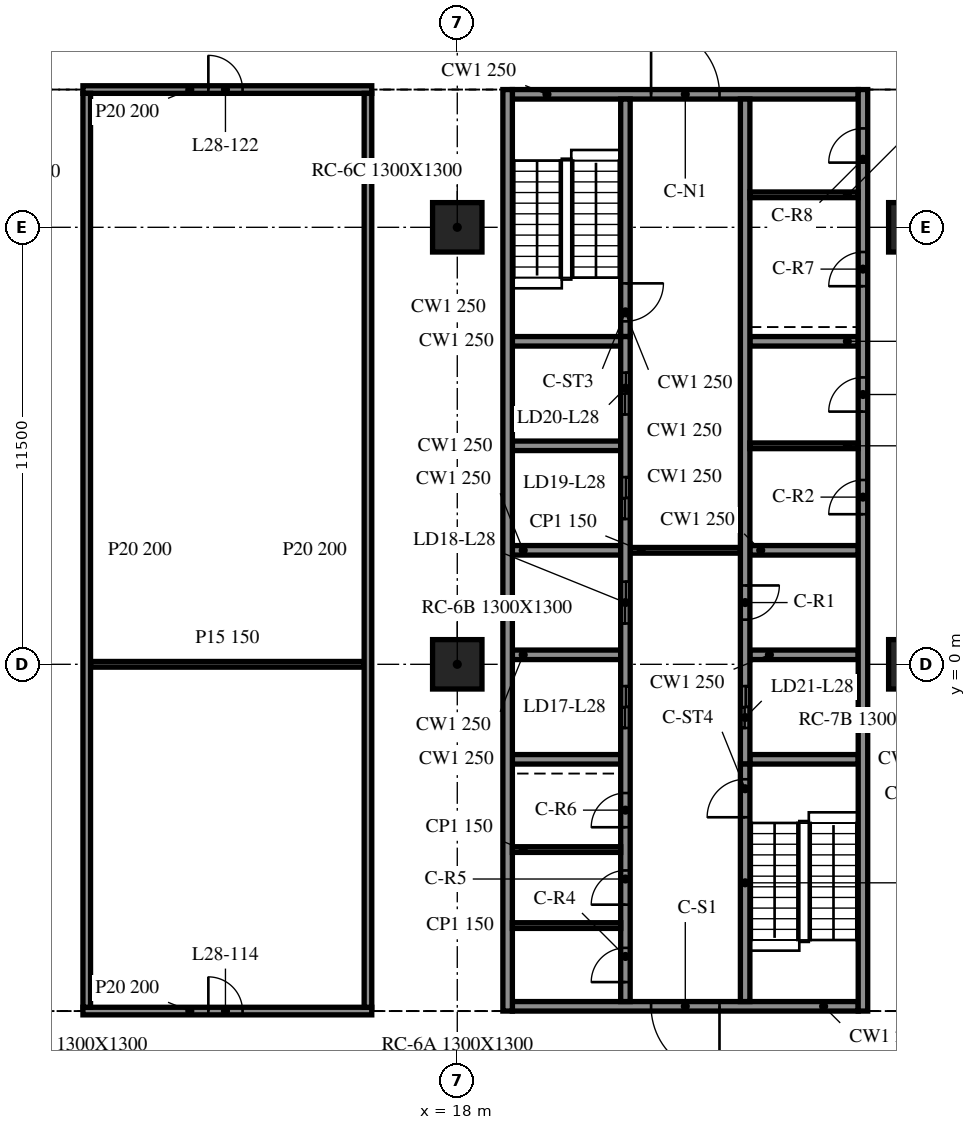
"""IFC4 building model, lengths in metres.
Left out: names, types, materials, properties, quantities, classifications, styles, units other than length and angle.
Written with IfcOpenShell. Run it as: python <this file> out.ifc"""

import sys

from ifc_helpers import new_model, si_unit, direction, frame, frame_2d, origin, origin_2d, place, context, subcontext, project, spatial, rectangle, extrude, element, fill, save


model = new_model("IFC4")
c1 = context("Model", 3, precision=1e-05, world=origin(), true_north=direction((0.0, 1.0)))
c2 = subcontext(c1, "Body", "Model", "MODEL_VIEW")
j1 = project(units=[si_unit("LENGTHUNIT", "METRE"), si_unit("PLANEANGLEUNIT", "RADIAN")], contexts=[c1])
p1 = place(None, origin())
s1 = spatial("IfcSite", under=j1, at=p1, CompositionType="ELEMENT")
p2 = place(p1, origin())
s2 = spatial("IfcBuilding", under=s1, at=p2, CompositionType="ELEMENT")
p3 = place(p2, frame((0.0, 0.0, 122.0)))
s3 = spatial("IfcBuildingStorey", under=s2, at=p3, CompositionType="ELEMENT", Elevation=122.0)
for number, where, z_axis, x_axis in (
    (1, (18.0, 0.0, -0.34), (0.0, 0.0, 1.0), (1.0, 0.0, 0.0)),
    (2, (18.0, 11.5, -0.34), (0.0, 0.0, 1.0), (1.0, 0.0, 0.0)),
    (3, (30.0, 0.0, -0.34), (0.0, 0.0, 1.0), (1.0, 0.0, 0.0)),
    (4, (30.0, 11.5, -0.34), (0.0, 0.0, 1.0), (1.0, 0.0, 0.0)),
):
    element("IfcColumn", number, at=place(p3, frame(where, z_axis=z_axis, x_axis=x_axis)), inside=s3, PredefinedType="COLUMN", context=c2, shape_type="SweptSolid", body=[
        extrude(rectangle(XDim=1.3, YDim=1.3, at=origin_2d()), origin(), (0.0, 0.0, 1.0), 4.1),
    ])
p4 = place(p3, frame((19.325, 15.125, 0.0), z_axis=(0.0, 0.0, 1.0), x_axis=(0.0, -1.0, 0.0)))
e5 = element("IfcWall", 5, at=p4, inside=s3, PredefinedType="SOLIDWALL", context=c2, shape_type="SweptSolid", body=[
    extrude(rectangle(XDim=24.25, YDim=0.25, at=frame_2d((12.125, 0.0))), origin(), (0.0, 0.0, 1.0), 3.76),
])
p5 = place(p3, frame((28.675, -9.125, 0.0), z_axis=(0.0, 0.0, 1.0), x_axis=(0.0, 1.0, 0.0)))
e6 = element("IfcWall", 6, at=p5, inside=s3, PredefinedType="SOLIDWALL", context=c2, shape_type="SweptSolid", body=[
    extrude(rectangle(XDim=24.25, YDim=0.25, at=frame_2d((12.125, 0.0))), origin(), (0.0, 0.0, 1.0), 3.76),
])
p6 = place(p5, frame((13.075, 0.0, 0.0)))
e7 = element("IfcOpeningElement", 7, at=p6, cuts=e6, PredefinedType="OPENING", context=c2, shape_type="SweptSolid", body=[
    extrude(rectangle(XDim=0.9, YDim=2.1, at=frame_2d((0.45, 1.05))), frame((0.0, 0.135, 0.0), z_axis=(0.0, -1.0, 0.0), x_axis=(1.0, 0.0, 0.0)), (0.0, 0.0, 1.0), 0.27),
])
p7 = place(p5, frame((15.775, 0.0, 0.0)))
e8 = element("IfcOpeningElement", 8, at=p7, cuts=e6, PredefinedType="OPENING", context=c2, shape_type="SweptSolid", body=[
    extrude(rectangle(XDim=0.9, YDim=2.1, at=frame_2d((0.45, 1.05))), frame((0.0, 0.135, 0.0), z_axis=(0.0, -1.0, 0.0), x_axis=(1.0, 0.0, 0.0)), (0.0, 0.0, 1.0), 0.27),
])
p8 = place(p5, frame((19.075, 0.0, 0.0)))
e9 = element("IfcOpeningElement", 9, at=p8, cuts=e6, PredefinedType="OPENING", context=c2, shape_type="SweptSolid", body=[
    extrude(rectangle(XDim=0.9, YDim=2.1, at=frame_2d((0.45, 1.05))), frame((0.0, 0.135, 0.0), z_axis=(0.0, -1.0, 0.0), x_axis=(1.0, 0.0, 0.0)), (0.0, 0.0, 1.0), 0.27),
])
p9 = place(p5, frame((22.327, 0.0, 0.0)))
e10 = element("IfcOpeningElement", 10, at=p9, cuts=e6, PredefinedType="OPENING", context=c2, shape_type="SweptSolid", body=[
    extrude(rectangle(XDim=0.9, YDim=2.1, at=frame_2d((0.45, 1.05))), frame((0.0, 0.135, 0.0), z_axis=(0.0, -1.0, 0.0), x_axis=(1.0, 0.0, 0.0)), (0.0, 0.0, 1.0), 0.27),
])
p10 = place(p3, frame((28.55, -9.0, 0.0), z_axis=(0.0, 0.0, 1.0), x_axis=(-1.0, 0.0, 0.0)))
e11 = element("IfcWall", 11, at=p10, inside=s3, PredefinedType="SOLIDWALL", context=c2, shape_type="SweptSolid", body=[
    extrude(rectangle(XDim=9.1, YDim=0.25, at=frame_2d((4.55, 0.0))), origin(), (0.0, 0.0, 1.0), 3.76),
])
p11 = place(p10, frame((3.65, 0.0, 0.0)))
e12 = element("IfcOpeningElement", 12, at=p11, cuts=e11, PredefinedType="OPENING", context=c2, shape_type="SweptSolid", body=[
    extrude(rectangle(XDim=1.8, YDim=2.1, at=frame_2d((0.9, 1.05))), frame((0.0, 0.135, 0.0), z_axis=(0.0, -1.0, 0.0), x_axis=(1.0, 0.0, 0.0)), (0.0, 0.0, 1.0), 0.27),
])
p12 = place(p3, frame((19.45, 15.0, 0.0), z_axis=(0.0, 0.0, 1.0), x_axis=(1.0, 0.0, 0.0)))
e13 = element("IfcWall", 13, at=p12, inside=s3, PredefinedType="SOLIDWALL", context=c2, shape_type="SweptSolid", body=[
    extrude(rectangle(XDim=9.1, YDim=0.25, at=frame_2d((4.55, 0.0))), origin(), (0.0, 0.0, 1.0), 3.76),
])
p13 = place(p12, frame((3.65, 0.0, 0.0)))
e14 = element("IfcOpeningElement", 14, at=p13, cuts=e13, PredefinedType="OPENING", context=c2, shape_type="SweptSolid", body=[
    extrude(rectangle(XDim=1.8, YDim=2.1, at=frame_2d((0.9, 1.05))), frame((0.0, 0.135, 0.0), z_axis=(0.0, -1.0, 0.0), x_axis=(1.0, 0.0, 0.0)), (0.0, 0.0, 1.0), 0.27),
])
p14 = place(p3, frame((22.425, -8.875, 0.0), z_axis=(0.0, 0.0, 1.0), x_axis=(0.0, 1.0, 0.0)))
e15 = element("IfcWall", 15, at=p14, inside=s3, PredefinedType="SOLIDWALL", context=c2, shape_type="SweptSolid", body=[
    extrude(rectangle(XDim=17.5, YDim=0.25, at=frame_2d((8.75, 0.0))), origin(), (0.0, 0.0, 1.0), 3.76),
])
p15 = place(p14, frame((7.2, 0.0, 0.0)))
e16 = element("IfcOpeningElement", 16, at=p15, cuts=e15, PredefinedType="OPENING", context=c2, shape_type="SweptSolid", body=[
    extrude(rectangle(XDim=1.1, YDim=2.1, at=frame_2d((0.55, 1.05))), frame((0.0, 0.135, 0.0), z_axis=(0.0, -1.0, 0.0), x_axis=(1.0, 0.0, 0.0)), (0.0, 0.0, 1.0), 0.27),
])
p16 = place(p14, frame((9.95, 0.0, 0.0)))
e17 = element("IfcOpeningElement", 17, at=p16, cuts=e15, PredefinedType="OPENING", context=c2, shape_type="SweptSolid", body=[
    extrude(rectangle(XDim=1.1, YDim=2.1, at=frame_2d((0.55, 1.05))), frame((0.0, 0.135, 0.0), z_axis=(0.0, -1.0, 0.0), x_axis=(1.0, 0.0, 0.0)), (0.0, 0.0, 1.0), 0.27),
])
p17 = place(p14, frame((12.7, 0.0, 0.0)))
e18 = element("IfcOpeningElement", 18, at=p17, cuts=e15, PredefinedType="OPENING", context=c2, shape_type="SweptSolid", body=[
    extrude(rectangle(XDim=1.1, YDim=2.1, at=frame_2d((0.55, 1.05))), frame((0.0, 0.135, 0.0), z_axis=(0.0, -1.0, 0.0), x_axis=(1.0, 0.0, 0.0)), (0.0, 0.0, 1.0), 0.27),
])
p18 = place(p14, frame((15.45, 0.0, 0.0)))
e19 = element("IfcOpeningElement", 19, at=p18, cuts=e15, PredefinedType="OPENING", context=c2, shape_type="SweptSolid", body=[
    extrude(rectangle(XDim=1.1, YDim=2.1, at=frame_2d((0.55, 1.05))), frame((0.0, 0.135, 0.0), z_axis=(0.0, -1.0, 0.0), x_axis=(1.0, 0.0, 0.0)), (0.0, 0.0, 1.0), 0.27),
])
p19 = place(p14, frame((0.512, 0.0, 0.0)))
e20 = element("IfcOpeningElement", 20, at=p19, cuts=e15, PredefinedType="OPENING", context=c2, shape_type="SweptSolid", body=[
    extrude(rectangle(XDim=0.9, YDim=2.1, at=frame_2d((0.45, 1.05))), frame((0.0, 0.135, 0.0), z_axis=(0.0, -1.0, 0.0), x_axis=(1.0, 0.0, 0.0)), (0.0, 0.0, 1.0), 0.27),
])
p20 = place(p14, frame((2.55, 0.0, 0.0)))
e21 = element("IfcOpeningElement", 21, at=p20, cuts=e15, PredefinedType="OPENING", context=c2, shape_type="SweptSolid", body=[
    extrude(rectangle(XDim=0.9, YDim=2.1, at=frame_2d((0.45, 1.05))), frame((0.0, 0.135, 0.0), z_axis=(0.0, -1.0, 0.0), x_axis=(1.0, 0.0, 0.0)), (0.0, 0.0, 1.0), 0.27),
])
p21 = place(p14, frame((4.587, 0.0, 0.0)))
e22 = element("IfcOpeningElement", 22, at=p21, cuts=e15, PredefinedType="OPENING", context=c2, shape_type="SweptSolid", body=[
    extrude(rectangle(XDim=0.9, YDim=2.1, at=frame_2d((0.45, 1.05))), frame((0.0, 0.135, 0.0), z_axis=(0.0, -1.0, 0.0), x_axis=(1.0, 0.0, 0.0)), (0.0, 0.0, 1.0), 0.27),
])
p22 = place(p3, frame((22.425, 14.875, 0.0), z_axis=(0.0, 0.0, 1.0), x_axis=(0.0, -1.0, 0.0)))
e23 = element("IfcWall", 23, at=p22, inside=s3, PredefinedType="SOLIDWALL", context=c2, shape_type="SweptSolid", body=[
    extrude(rectangle(XDim=6.25, YDim=0.25, at=frame_2d((3.125, 0.0))), origin(), (0.0, 0.0, 1.0), 3.76),
])
p23 = place(p22, frame((4.85, 0.0, 0.0)))
e24 = element("IfcOpeningElement", 24, at=p23, cuts=e23, PredefinedType="OPENING", context=c2, shape_type="SweptSolid", body=[
    extrude(rectangle(XDim=1.0, YDim=2.1, at=frame_2d((0.5, 1.05))), frame((0.0, 0.135, 0.0), z_axis=(0.0, -1.0, 0.0), x_axis=(1.0, 0.0, 0.0)), (0.0, 0.0, 1.0), 0.27),
])
p24 = place(p3, frame((25.575, -8.875, 0.0), z_axis=(0.0, 0.0, 1.0), x_axis=(0.0, 1.0, 0.0)))
e25 = element("IfcWall", 25, at=p24, inside=s3, PredefinedType="SOLIDWALL", context=c2, shape_type="SweptSolid", body=[
    extrude(rectangle(XDim=6.25, YDim=0.25, at=frame_2d((3.125, 0.0))), origin(), (0.0, 0.0, 1.0), 3.76),
])
p25 = place(p24, frame((4.85, 0.0, 0.0)))
e26 = element("IfcOpeningElement", 26, at=p25, cuts=e25, PredefinedType="OPENING", context=c2, shape_type="SweptSolid", body=[
    extrude(rectangle(XDim=1.0, YDim=2.1, at=frame_2d((0.5, 1.05))), frame((0.0, 0.135, 0.0), z_axis=(0.0, -1.0, 0.0), x_axis=(1.0, 0.0, 0.0)), (0.0, 0.0, 1.0), 0.27),
])
p26 = place(p3, frame((25.575, 14.875, 0.0), z_axis=(0.0, 0.0, 1.0), x_axis=(0.0, -1.0, 0.0)))
e27 = element("IfcWall", 27, at=p26, inside=s3, PredefinedType="SOLIDWALL", context=c2, shape_type="SweptSolid", body=[
    extrude(rectangle(XDim=17.5, YDim=0.25, at=frame_2d((8.75, 0.0))), origin(), (0.0, 0.0, 1.0), 3.76),
])
p27 = place(p26, frame((15.45, 0.0, 0.0)))
e28 = element("IfcOpeningElement", 28, at=p27, cuts=e27, PredefinedType="OPENING", context=c2, shape_type="SweptSolid", body=[
    extrude(rectangle(XDim=1.1, YDim=2.1, at=frame_2d((0.55, 1.05))), frame((0.0, 0.135, 0.0), z_axis=(0.0, -1.0, 0.0), x_axis=(1.0, 0.0, 0.0)), (0.0, 0.0, 1.0), 0.27),
])
p28 = place(p26, frame((12.8, 0.0, 0.0)))
e29 = element("IfcOpeningElement", 29, at=p28, cuts=e27, PredefinedType="OPENING", context=c2, shape_type="SweptSolid", body=[
    extrude(rectangle(XDim=0.9, YDim=2.1, at=frame_2d((0.45, 1.05))), frame((0.0, 0.135, 0.0), z_axis=(0.0, -1.0, 0.0), x_axis=(1.0, 0.0, 0.0)), (0.0, 0.0, 1.0), 0.27),
])
for number, where, z_axis, x_axis in (
    (30, (19.45, -2.5, 0.0), (0.0, 0.0, 1.0), (1.0, 0.0, 0.0)),
    (31, (19.45, 0.25, 0.0), (0.0, 0.0, 1.0), (1.0, 0.0, 0.0)),
    (32, (19.45, 3.0, 0.0), (0.0, 0.0, 1.0), (1.0, 0.0, 0.0)),
    (33, (19.45, 5.75, 0.0), (0.0, 0.0, 1.0), (1.0, 0.0, 0.0)),
    (34, (19.45, 8.5, 0.0), (0.0, 0.0, 1.0), (1.0, 0.0, 0.0)),
    (35, (25.7, -2.5, 0.0), (0.0, 0.0, 1.0), (1.0, 0.0, 0.0)),
    (36, (25.7, 0.25, 0.0), (0.0, 0.0, 1.0), (1.0, 0.0, 0.0)),
    (37, (25.7, 3.0, 0.0), (0.0, 0.0, 1.0), (1.0, 0.0, 0.0)),
    (38, (25.7, 8.5, 0.0), (0.0, 0.0, 1.0), (1.0, 0.0, 0.0)),
):
    element("IfcWall", number, at=place(p3, frame(where, z_axis=z_axis, x_axis=x_axis)), inside=s3, PredefinedType="SOLIDWALL", context=c2, shape_type="SweptSolid", body=[
        extrude(rectangle(XDim=2.85, YDim=0.25, at=frame_2d((1.425, 0.0))), origin(), (0.0, 0.0, 1.0), 3.76),
    ])
p29 = place(p3, frame((22.55, 3.0, 0.0), z_axis=(0.0, 0.0, 1.0), x_axis=(1.0, 0.0, 0.0)))
e39 = element("IfcWall", 39, at=p29, inside=s3, PredefinedType="PARTITIONING", context=c2, shape_type="SweptSolid", body=[
    extrude(rectangle(XDim=2.9, YDim=0.15, at=frame_2d((1.45, 0.0))), origin(), (0.0, 0.0, 1.0), 3.76),
])
for number, where, z_axis, x_axis in (
    (40, (25.7, 5.75, 0.0), (0.0, 0.0, 1.0), (1.0, 0.0, 0.0)),
    (41, (19.45, -6.875, 0.0), (0.0, 0.0, 1.0), (1.0, 0.0, 0.0)),
    (42, (19.45, -4.875, 0.0), (0.0, 0.0, 1.0), (1.0, 0.0, 0.0)),
    (43, (25.7, 12.355, 0.0), (0.0, 0.0, 1.0), (1.0, 0.0, 0.0)),
):
    element("IfcWall", number, at=place(p3, frame(where, z_axis=z_axis, x_axis=x_axis)), inside=s3, PredefinedType="PARTITIONING", context=c2, shape_type="SweptSolid", body=[
        extrude(rectangle(XDim=2.85, YDim=0.15, at=frame_2d((1.425, 0.0))), origin(), (0.0, 0.0, 1.0), 3.76),
    ])
p30 = place(p3, frame((8.15, -9.125, 0.0), z_axis=(0.0, 0.0, 1.0), x_axis=(1.0, 0.0, 0.0)))
e44 = element("IfcWall", 44, at=p30, inside=s3, PredefinedType="PARTITIONING", context=c2, shape_type="SweptSolid", body=[
    extrude(rectangle(XDim=7.6, YDim=0.2, at=frame_2d((3.8, 0.0))), origin(), (0.0, 0.0, 1.0), 3.76),
])
p31 = place(p30, frame((3.3, 0.0, 0.0)))
e45 = element("IfcOpeningElement", 45, at=p31, cuts=e44, PredefinedType="OPENING", context=c2, shape_type="SweptSolid", body=[
    extrude(rectangle(XDim=0.9, YDim=2.1, at=frame_2d((0.45, 1.05))), frame((0.0, 0.11, 0.0), z_axis=(0.0, -1.0, 0.0), x_axis=(1.0, 0.0, 0.0)), (0.0, 0.0, 1.0), 0.22),
])
p32 = place(p3, frame((8.35, 0.0, 0.0), z_axis=(0.0, 0.0, 1.0), x_axis=(1.0, 0.0, 0.0)))
e46 = element("IfcWall", 46, at=p32, inside=s3, PredefinedType="PARTITIONING", context=c2, shape_type="SweptSolid", body=[
    extrude(rectangle(XDim=7.2, YDim=0.15, at=frame_2d((3.6, 0.0))), origin(), (0.0, 0.0, 1.0), 3.76),
])
p33 = place(p3, frame((8.15, 15.125, 0.0), z_axis=(0.0, 0.0, 1.0), x_axis=(1.0, 0.0, 0.0)))
e47 = element("IfcWall", 47, at=p33, inside=s3, PredefinedType="PARTITIONING", context=c2, shape_type="SweptSolid", body=[
    extrude(rectangle(XDim=7.6, YDim=0.2, at=frame_2d((3.8, 0.0))), origin(), (0.0, 0.0, 1.0), 3.76),
])
p34 = place(p33, frame((3.3, 0.0, 0.0)))
e48 = element("IfcOpeningElement", 48, at=p34, cuts=e47, PredefinedType="OPENING", context=c2, shape_type="SweptSolid", body=[
    extrude(rectangle(XDim=0.9, YDim=2.1, at=frame_2d((0.45, 1.05))), frame((0.0, 0.11, 0.0), z_axis=(0.0, -1.0, 0.0), x_axis=(1.0, 0.0, 0.0)), (0.0, 0.0, 1.0), 0.22),
])
for number, where, z_axis, x_axis in (
    (49, (8.25, -9.025, 0.0), (0.0, 0.0, 1.0), (0.0, 1.0, 0.0)),
    (50, (15.65, -9.025, 0.0), (0.0, 0.0, 1.0), (0.0, 1.0, 0.0)),
):
    element("IfcWall", number, at=place(p3, frame(where, z_axis=z_axis, x_axis=x_axis)), inside=s3, PredefinedType="PARTITIONING", context=c2, shape_type="SweptSolid", body=[
        extrude(rectangle(XDim=24.05, YDim=0.2, at=frame_2d((12.025, 0.0))), origin(), (0.0, 0.0, 1.0), 3.76),
    ])
p35 = place(p11, origin())
e51 = element("IfcDoor", 51, at=p35, inside=s3, OperationType="DOUBLE_DOOR_SINGLE_SWING", PredefinedType="DOOR", context=c2, shape_type="SweptSolid", body=[
    extrude(rectangle(XDim=1.8, YDim=2.1, at=frame_2d((0.9, 1.05))), frame((0.0, 0.025, 0.0), z_axis=(0.0, -1.0, 0.0), x_axis=(1.0, 0.0, 0.0)), (0.0, 0.0, 1.0), 0.05),
])
fill(e12, e51)
p36 = place(p13, origin())
e52 = element("IfcDoor", 52, at=p36, inside=s3, OperationType="DOUBLE_DOOR_SINGLE_SWING", PredefinedType="DOOR", context=c2, shape_type="SweptSolid", body=[
    extrude(rectangle(XDim=1.8, YDim=2.1, at=frame_2d((0.9, 1.05))), frame((0.0, 0.025, 0.0), z_axis=(0.0, -1.0, 0.0), x_axis=(1.0, 0.0, 0.0)), (0.0, 0.0, 1.0), 0.05),
])
fill(e14, e52)
p37 = place(p27, origin())
e53 = element("IfcDoor", 53, at=p37, inside=s3, OperationType="DOUBLE_DOOR_SLIDING", PredefinedType="DOOR", context=c2, shape_type="SweptSolid", body=[
    extrude(rectangle(XDim=1.1, YDim=2.1, at=frame_2d((0.55, 1.05))), frame((0.0, 0.025, 0.0), z_axis=(0.0, -1.0, 0.0), x_axis=(1.0, 0.0, 0.0)), (0.0, 0.0, 1.0), 0.05),
])
fill(e28, e53)
p38 = place(p15, origin())
e54 = element("IfcDoor", 54, at=p38, inside=s3, OperationType="DOUBLE_DOOR_SLIDING", PredefinedType="DOOR", context=c2, shape_type="SweptSolid", body=[
    extrude(rectangle(XDim=1.1, YDim=2.1, at=frame_2d((0.55, 1.05))), frame((0.0, 0.025, 0.0), z_axis=(0.0, -1.0, 0.0), x_axis=(1.0, 0.0, 0.0)), (0.0, 0.0, 1.0), 0.05),
])
fill(e16, e54)
p39 = place(p16, origin())
e55 = element("IfcDoor", 55, at=p39, inside=s3, OperationType="DOUBLE_DOOR_SLIDING", PredefinedType="DOOR", context=c2, shape_type="SweptSolid", body=[
    extrude(rectangle(XDim=1.1, YDim=2.1, at=frame_2d((0.55, 1.05))), frame((0.0, 0.025, 0.0), z_axis=(0.0, -1.0, 0.0), x_axis=(1.0, 0.0, 0.0)), (0.0, 0.0, 1.0), 0.05),
])
fill(e17, e55)
p40 = place(p17, origin())
e56 = element("IfcDoor", 56, at=p40, inside=s3, OperationType="DOUBLE_DOOR_SLIDING", PredefinedType="DOOR", context=c2, shape_type="SweptSolid", body=[
    extrude(rectangle(XDim=1.1, YDim=2.1, at=frame_2d((0.55, 1.05))), frame((0.0, 0.025, 0.0), z_axis=(0.0, -1.0, 0.0), x_axis=(1.0, 0.0, 0.0)), (0.0, 0.0, 1.0), 0.05),
])
fill(e18, e56)
p41 = place(p18, origin())
e57 = element("IfcDoor", 57, at=p41, inside=s3, OperationType="DOUBLE_DOOR_SLIDING", PredefinedType="DOOR", context=c2, shape_type="SweptSolid", body=[
    extrude(rectangle(XDim=1.1, YDim=2.1, at=frame_2d((0.55, 1.05))), frame((0.0, 0.025, 0.0), z_axis=(0.0, -1.0, 0.0), x_axis=(1.0, 0.0, 0.0)), (0.0, 0.0, 1.0), 0.05),
])
fill(e19, e57)
p42 = place(p28, origin())
e58 = element("IfcDoor", 58, at=p42, inside=s3, OperationType="SINGLE_SWING_LEFT", PredefinedType="DOOR", context=c2, shape_type="SweptSolid", body=[
    extrude(rectangle(XDim=0.9, YDim=2.1, at=frame_2d((0.45, 1.05))), frame((0.0, 0.025, 0.0), z_axis=(0.0, -1.0, 0.0), x_axis=(1.0, 0.0, 0.0)), (0.0, 0.0, 1.0), 0.05),
])
fill(e29, e58)
p43 = place(p6, origin())
e59 = element("IfcDoor", 59, at=p43, inside=s3, OperationType="SINGLE_SWING_RIGHT", PredefinedType="DOOR", context=c2, shape_type="SweptSolid", body=[
    extrude(rectangle(XDim=0.9, YDim=2.1, at=frame_2d((0.45, 1.05))), frame((0.0, 0.025, 0.0), z_axis=(0.0, -1.0, 0.0), x_axis=(1.0, 0.0, 0.0)), (0.0, 0.0, 1.0), 0.05),
])
fill(e7, e59)
p44 = place(p7, origin())
e60 = element("IfcDoor", 60, at=p44, inside=s3, OperationType="SINGLE_SWING_LEFT", PredefinedType="DOOR", context=c2, shape_type="SweptSolid", body=[
    extrude(rectangle(XDim=0.9, YDim=2.1, at=frame_2d((0.45, 1.05))), frame((0.0, 0.025, 0.0), z_axis=(0.0, -1.0, 0.0), x_axis=(1.0, 0.0, 0.0)), (0.0, 0.0, 1.0), 0.05),
])
fill(e8, e60)
p45 = place(p19, origin())
e61 = element("IfcDoor", 61, at=p45, inside=s3, OperationType="SINGLE_SWING_RIGHT", PredefinedType="DOOR", context=c2, shape_type="SweptSolid", body=[
    extrude(rectangle(XDim=0.9, YDim=2.1, at=frame_2d((0.45, 1.05))), frame((0.0, 0.025, 0.0), z_axis=(0.0, -1.0, 0.0), x_axis=(1.0, 0.0, 0.0)), (0.0, 0.0, 1.0), 0.05),
])
fill(e20, e61)
p46 = place(p20, origin())
e62 = element("IfcDoor", 62, at=p46, inside=s3, OperationType="SINGLE_SWING_LEFT", PredefinedType="DOOR", context=c2, shape_type="SweptSolid", body=[
    extrude(rectangle(XDim=0.9, YDim=2.1, at=frame_2d((0.45, 1.05))), frame((0.0, 0.025, 0.0), z_axis=(0.0, -1.0, 0.0), x_axis=(1.0, 0.0, 0.0)), (0.0, 0.0, 1.0), 0.05),
])
fill(e21, e62)
p47 = place(p21, origin())
e63 = element("IfcDoor", 63, at=p47, inside=s3, OperationType="SINGLE_SWING_RIGHT", PredefinedType="DOOR", context=c2, shape_type="SweptSolid", body=[
    extrude(rectangle(XDim=0.9, YDim=2.1, at=frame_2d((0.45, 1.05))), frame((0.0, 0.025, 0.0), z_axis=(0.0, -1.0, 0.0), x_axis=(1.0, 0.0, 0.0)), (0.0, 0.0, 1.0), 0.05),
])
fill(e22, e63)
p48 = place(p8, origin())
e64 = element("IfcDoor", 64, at=p48, inside=s3, OperationType="SINGLE_SWING_LEFT", PredefinedType="DOOR", context=c2, shape_type="SweptSolid", body=[
    extrude(rectangle(XDim=0.9, YDim=2.1, at=frame_2d((0.45, 1.05))), frame((0.0, 0.025, 0.0), z_axis=(0.0, -1.0, 0.0), x_axis=(1.0, 0.0, 0.0)), (0.0, 0.0, 1.0), 0.05),
])
fill(e9, e64)
p49 = place(p9, origin())
e65 = element("IfcDoor", 65, at=p49, inside=s3, OperationType="SINGLE_SWING_RIGHT", PredefinedType="DOOR", context=c2, shape_type="SweptSolid", body=[
    extrude(rectangle(XDim=0.9, YDim=2.1, at=frame_2d((0.45, 1.05))), frame((0.0, 0.025, 0.0), z_axis=(0.0, -1.0, 0.0), x_axis=(1.0, 0.0, 0.0)), (0.0, 0.0, 1.0), 0.05),
])
fill(e10, e65)
p50 = place(p23, origin())
e66 = element("IfcDoor", 66, at=p50, inside=s3, OperationType="SINGLE_SWING_LEFT", PredefinedType="DOOR", context=c2, shape_type="SweptSolid", body=[
    extrude(rectangle(XDim=1.0, YDim=2.1, at=frame_2d((0.5, 1.05))), frame((0.0, 0.025, 0.0), z_axis=(0.0, -1.0, 0.0), x_axis=(1.0, 0.0, 0.0)), (0.0, 0.0, 1.0), 0.05),
])
fill(e24, e66)
p51 = place(p25, origin())
e67 = element("IfcDoor", 67, at=p51, inside=s3, OperationType="SINGLE_SWING_RIGHT", PredefinedType="DOOR", context=c2, shape_type="SweptSolid", body=[
    extrude(rectangle(XDim=1.0, YDim=2.1, at=frame_2d((0.5, 1.05))), frame((0.0, 0.025, 0.0), z_axis=(0.0, -1.0, 0.0), x_axis=(1.0, 0.0, 0.0)), (0.0, 0.0, 1.0), 0.05),
])
fill(e26, e67)
p52 = place(p31, origin())
e68 = element("IfcDoor", 68, at=p52, inside=s3, OperationType="SINGLE_SWING_LEFT", PredefinedType="DOOR", context=c2, shape_type="SweptSolid", body=[
    extrude(rectangle(XDim=0.9, YDim=2.1, at=frame_2d((0.45, 1.05))), frame((0.0, 0.025, 0.0), z_axis=(0.0, -1.0, 0.0), x_axis=(1.0, 0.0, 0.0)), (0.0, 0.0, 1.0), 0.05),
])
fill(e45, e68)
p53 = place(p34, origin())
e69 = element("IfcDoor", 69, at=p53, inside=s3, OperationType="SINGLE_SWING_RIGHT", PredefinedType="DOOR", context=c2, shape_type="SweptSolid", body=[
    extrude(rectangle(XDim=0.9, YDim=2.1, at=frame_2d((0.45, 1.05))), frame((0.0, 0.025, 0.0), z_axis=(0.0, -1.0, 0.0), x_axis=(1.0, 0.0, 0.0)), (0.0, 0.0, 1.0), 0.05),
])
fill(e48, e69)
save(model, sys.argv[1])
